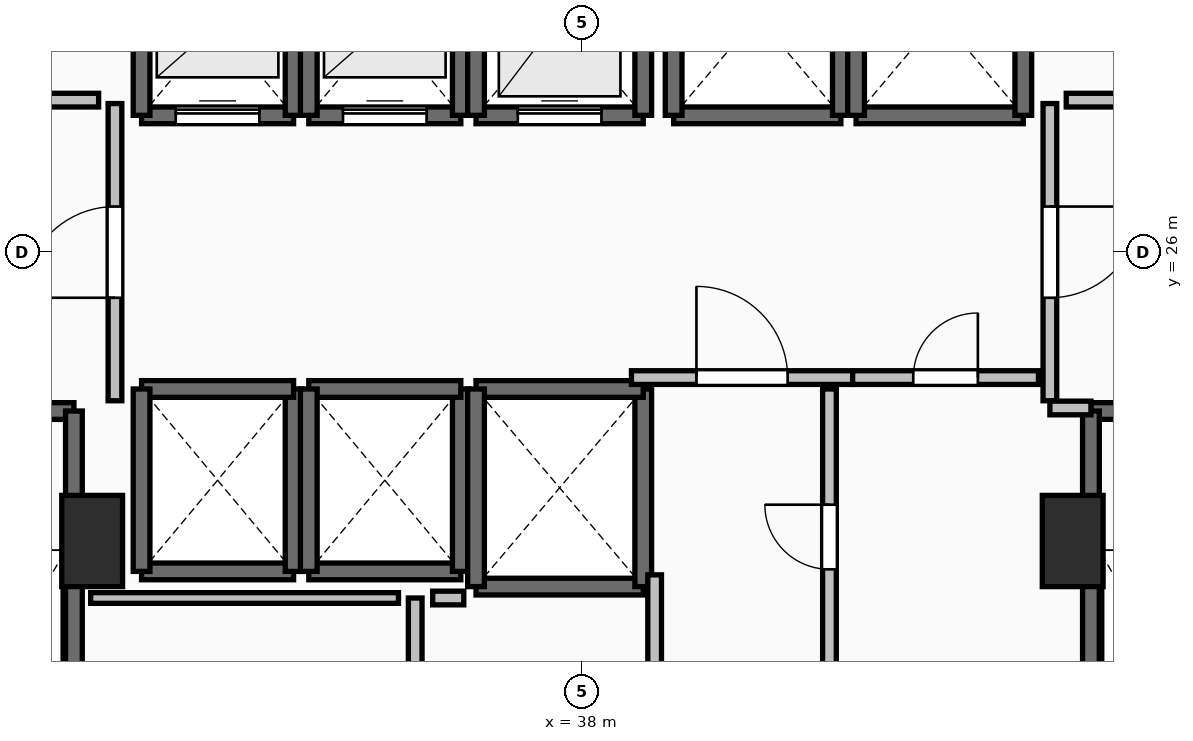
"""IFC4 building model, lengths in metres.
Left out: names, types, materials, properties, quantities, classifications, styles, units other than length and angle.
Written with IfcOpenShell. Run it as: python <this file> out.ifc"""

import sys

from ifc_helpers import new_model, si_unit, direction, frame, frame_2d, origin, origin_2d, place, context, subcontext, project, spatial, rectangle, extrude, element, fill, save


model = new_model("IFC4")
c1 = context("Model", 3, precision=1e-05, world=origin(), true_north=direction((0.0, 1.0)))
c2 = subcontext(c1, "Body", "Model", "MODEL_VIEW")
j1 = project(units=[si_unit("LENGTHUNIT", "METRE"), si_unit("PLANEANGLEUNIT", "RADIAN")], contexts=[c1])
p1 = place(None, origin())
s1 = spatial("IfcSite", under=j1, at=p1, CompositionType="ELEMENT")
p2 = place(p1, origin())
s2 = spatial("IfcBuilding", under=s1, at=p2, CompositionType="ELEMENT")
p3 = place(p2, frame((0.0, 0.0, 24.0)))
s3 = spatial("IfcBuildingStorey", under=s2, at=p3, CompositionType="ELEMENT", Elevation=24.0)
for number, where, z_axis, x_axis in (
    (1, (31.55, 22.2, 0.0), (0.0, 0.0, 1.0), (1.0, 0.0, 0.0)),
    (2, (44.45, 22.2, 0.0), (0.0, 0.0, 1.0), (1.0, 0.0, 0.0)),
):
    element("IfcColumn", number, at=place(p3, frame(where, z_axis=z_axis, x_axis=x_axis)), inside=s3, PredefinedType="PILASTER", context=c2, shape_type="SweptSolid", body=[
        extrude(rectangle(XDim=0.8, YDim=1.2, at=origin_2d()), origin(), (0.0, 0.0, 1.0), 3.5),
    ])
p4 = place(p3, frame((27.94, 23.91, 0.0), z_axis=(0.0, 0.0, 1.0), x_axis=(1.0, 0.0, 0.0)))
e3 = element("IfcWall", 3, at=p4, inside=s3, PredefinedType="SOLIDWALL", context=c2, shape_type="SweptSolid", body=[
    extrude(rectangle(XDim=3.37, YDim=0.22, at=frame_2d((1.685, 0.0))), origin(), (0.0, 0.0, 1.0), 3.24),
])
p5 = place(p4, frame((1.135, 0.0, 0.0)))
e4 = element("IfcOpeningElement", 4, at=p5, cuts=e3, PredefinedType="OPENING", context=c2, shape_type="SweptSolid", body=[
    extrude(rectangle(XDim=1.1, YDim=2.15, at=frame_2d((0.55, 1.075))), frame((0.0, 0.125, 0.0), z_axis=(0.0, -1.0, 0.0), x_axis=(1.0, 0.0, 0.0)), (0.0, 0.0, 1.0), 0.25),
])
p6 = place(p3, frame((31.31, 23.91, 0.0), z_axis=(0.0, 0.0, 1.0), x_axis=(0.0, -1.0, 0.0)))
e5 = element("IfcWall", 5, at=p6, inside=s3, PredefinedType="SOLIDWALL", context=c2, shape_type="SweptSolid", body=[
    extrude(rectangle(XDim=7.42, YDim=0.22, at=frame_2d((3.71, 0.0))), origin(), (0.0, 0.0, 1.0), 3.24),
])
p7 = place(p3, frame((44.69, 23.91, 0.0), z_axis=(0.0, 0.0, 1.0), x_axis=(1.0, 0.0, 0.0)))
e6 = element("IfcWall", 6, at=p7, inside=s3, PredefinedType="SOLIDWALL", context=c2, shape_type="SweptSolid", body=[
    extrude(rectangle(XDim=3.37, YDim=0.22, at=frame_2d((1.685, 0.0))), origin(), (0.0, 0.0, 1.0), 3.24),
])
p8 = place(p7, frame((1.135, 0.0, 0.0)))
e7 = element("IfcOpeningElement", 7, at=p8, cuts=e6, PredefinedType="OPENING", context=c2, shape_type="SweptSolid", body=[
    extrude(rectangle(XDim=1.1, YDim=2.15, at=frame_2d((0.55, 1.075))), frame((0.0, 0.125, 0.0), z_axis=(0.0, -1.0, 0.0), x_axis=(1.0, 0.0, 0.0)), (0.0, 0.0, 1.0), 0.25),
])
p9 = place(p3, frame((44.69, 16.49, 0.0), z_axis=(0.0, 0.0, 1.0), x_axis=(0.0, 1.0, 0.0)))
e8 = element("IfcWall", 8, at=p9, inside=s3, PredefinedType="SOLIDWALL", context=c2, shape_type="SweptSolid", body=[
    extrude(rectangle(XDim=7.42, YDim=0.22, at=frame_2d((3.71, 0.0))), origin(), (0.0, 0.0, 1.0), 3.24),
])
p10 = place(p3, frame((32.2, 27.8, 0.0), z_axis=(0.0, 0.0, 1.0), x_axis=(1.0, 0.0, 0.0)))
e9 = element("IfcWall", 9, at=p10, inside=s3, PredefinedType="SOLIDWALL", context=c2, shape_type="SweptSolid", body=[
    extrude(rectangle(XDim=2.0, YDim=0.22, at=frame_2d((1.0, 0.0))), origin(), (0.0, 0.0, 1.0), 3.24),
])
p11 = place(p10, frame((0.45, 0.0, 0.0)))
e10 = element("IfcOpeningElement", 10, at=p11, cuts=e9, PredefinedType="OPENING", context=c2, shape_type="SweptSolid", body=[
    extrude(rectangle(XDim=1.1, YDim=2.2, at=frame_2d((0.55, 1.1))), frame((0.0, 0.125, 0.0), z_axis=(0.0, -1.0, 0.0), x_axis=(1.0, 0.0, 0.0)), (0.0, 0.0, 1.0), 0.25),
])
for number, where, z_axis, x_axis in (
    (11, (34.2, 27.8, 0.0), (0.0, 0.0, 1.0), (0.0, 1.0, 0.0)),
    (12, (32.2, 30.2, 0.0), (0.0, 0.0, 1.0), (0.0, -1.0, 0.0)),
):
    element("IfcWall", number, at=place(p3, frame(where, z_axis=z_axis, x_axis=x_axis)), inside=s3, PredefinedType="SOLIDWALL", context=c2, shape_type="SweptSolid", body=[
        extrude(rectangle(XDim=2.4, YDim=0.22, at=frame_2d((1.2, 0.0))), origin(), (0.0, 0.0, 1.0), 3.24),
    ])
p12 = place(p3, frame((34.4, 27.8, 0.0), z_axis=(0.0, 0.0, 1.0), x_axis=(1.0, 0.0, 0.0)))
e13 = element("IfcWall", 13, at=p12, inside=s3, PredefinedType="SOLIDWALL", context=c2, shape_type="SweptSolid", body=[
    extrude(rectangle(XDim=2.0, YDim=0.22, at=frame_2d((1.0, 0.0))), origin(), (0.0, 0.0, 1.0), 3.24),
])
p13 = place(p12, frame((0.45, 0.0, 0.0)))
e14 = element("IfcOpeningElement", 14, at=p13, cuts=e13, PredefinedType="OPENING", context=c2, shape_type="SweptSolid", body=[
    extrude(rectangle(XDim=1.1, YDim=2.2, at=frame_2d((0.55, 1.1))), frame((0.0, 0.125, 0.0), z_axis=(0.0, -1.0, 0.0), x_axis=(1.0, 0.0, 0.0)), (0.0, 0.0, 1.0), 0.25),
])
for number, where, z_axis, x_axis in (
    (15, (36.4, 27.8, 0.0), (0.0, 0.0, 1.0), (0.0, 1.0, 0.0)),
    (16, (34.4, 30.2, 0.0), (0.0, 0.0, 1.0), (0.0, -1.0, 0.0)),
):
    element("IfcWall", number, at=place(p3, frame(where, z_axis=z_axis, x_axis=x_axis)), inside=s3, PredefinedType="SOLIDWALL", context=c2, shape_type="SweptSolid", body=[
        extrude(rectangle(XDim=2.4, YDim=0.22, at=frame_2d((1.2, 0.0))), origin(), (0.0, 0.0, 1.0), 3.24),
    ])
p14 = place(p3, frame((36.6, 27.8, 0.0), z_axis=(0.0, 0.0, 1.0), x_axis=(1.0, 0.0, 0.0)))
e17 = element("IfcWall", 17, at=p14, inside=s3, PredefinedType="SOLIDWALL", context=c2, shape_type="SweptSolid", body=[
    extrude(rectangle(XDim=2.2, YDim=0.22, at=frame_2d((1.1, 0.0))), origin(), (0.0, 0.0, 1.0), 3.24),
])
p15 = place(p14, frame((0.55, 0.0, 0.0)))
e18 = element("IfcOpeningElement", 18, at=p15, cuts=e17, PredefinedType="OPENING", context=c2, shape_type="SweptSolid", body=[
    extrude(rectangle(XDim=1.1, YDim=2.2, at=frame_2d((0.55, 1.1))), frame((0.0, 0.125, 0.0), z_axis=(0.0, -1.0, 0.0), x_axis=(1.0, 0.0, 0.0)), (0.0, 0.0, 1.0), 0.25),
])
for number, where, z_axis, x_axis in (
    (19, (38.8, 27.8, 0.0), (0.0, 0.0, 1.0), (0.0, 1.0, 0.0)),
    (20, (36.6, 30.4, 0.0), (0.0, 0.0, 1.0), (0.0, -1.0, 0.0)),
):
    element("IfcWall", number, at=place(p3, frame(where, z_axis=z_axis, x_axis=x_axis)), inside=s3, PredefinedType="SOLIDWALL", context=c2, shape_type="SweptSolid", body=[
        extrude(rectangle(XDim=2.6, YDim=0.22, at=frame_2d((1.3, 0.0))), origin(), (0.0, 0.0, 1.0), 3.24),
    ])
p16 = place(p3, frame((32.2, 21.8, 0.0), z_axis=(0.0, 0.0, 1.0), x_axis=(1.0, 0.0, 0.0)))
e21 = element("IfcWall", 21, at=p16, inside=s3, PredefinedType="SOLIDWALL", context=c2, shape_type="SweptSolid", body=[
    extrude(rectangle(XDim=2.0, YDim=0.22, at=frame_2d((1.0, 0.0))), origin(), (0.0, 0.0, 1.0), 3.24),
])
p17 = place(p3, frame((34.2, 21.8, 0.0), z_axis=(0.0, 0.0, 1.0), x_axis=(0.0, 1.0, 0.0)))
e22 = element("IfcWall", 22, at=p17, inside=s3, PredefinedType="SOLIDWALL", context=c2, shape_type="SweptSolid", body=[
    extrude(rectangle(XDim=2.4, YDim=0.22, at=frame_2d((1.2, 0.0))), origin(), (0.0, 0.0, 1.0), 3.24),
])
p18 = place(p3, frame((34.2, 24.2, 0.0), z_axis=(0.0, 0.0, 1.0), x_axis=(-1.0, 0.0, 0.0)))
e23 = element("IfcWall", 23, at=p18, inside=s3, PredefinedType="SOLIDWALL", context=c2, shape_type="SweptSolid", body=[
    extrude(rectangle(XDim=2.0, YDim=0.22, at=frame_2d((1.0, 0.0))), origin(), (0.0, 0.0, 1.0), 3.24),
])
p19 = place(p3, frame((32.2, 24.2, 0.0), z_axis=(0.0, 0.0, 1.0), x_axis=(0.0, -1.0, 0.0)))
e24 = element("IfcWall", 24, at=p19, inside=s3, PredefinedType="SOLIDWALL", context=c2, shape_type="SweptSolid", body=[
    extrude(rectangle(XDim=2.4, YDim=0.22, at=frame_2d((1.2, 0.0))), origin(), (0.0, 0.0, 1.0), 3.24),
])
p20 = place(p3, frame((34.4, 21.8, 0.0), z_axis=(0.0, 0.0, 1.0), x_axis=(1.0, 0.0, 0.0)))
e25 = element("IfcWall", 25, at=p20, inside=s3, PredefinedType="SOLIDWALL", context=c2, shape_type="SweptSolid", body=[
    extrude(rectangle(XDim=2.0, YDim=0.22, at=frame_2d((1.0, 0.0))), origin(), (0.0, 0.0, 1.0), 3.24),
])
p21 = place(p3, frame((36.4, 21.8, 0.0), z_axis=(0.0, 0.0, 1.0), x_axis=(0.0, 1.0, 0.0)))
e26 = element("IfcWall", 26, at=p21, inside=s3, PredefinedType="SOLIDWALL", context=c2, shape_type="SweptSolid", body=[
    extrude(rectangle(XDim=2.4, YDim=0.22, at=frame_2d((1.2, 0.0))), origin(), (0.0, 0.0, 1.0), 3.24),
])
p22 = place(p3, frame((36.4, 24.2, 0.0), z_axis=(0.0, 0.0, 1.0), x_axis=(-1.0, 0.0, 0.0)))
e27 = element("IfcWall", 27, at=p22, inside=s3, PredefinedType="SOLIDWALL", context=c2, shape_type="SweptSolid", body=[
    extrude(rectangle(XDim=2.0, YDim=0.22, at=frame_2d((1.0, 0.0))), origin(), (0.0, 0.0, 1.0), 3.24),
])
p23 = place(p3, frame((34.4, 24.2, 0.0), z_axis=(0.0, 0.0, 1.0), x_axis=(0.0, -1.0, 0.0)))
e28 = element("IfcWall", 28, at=p23, inside=s3, PredefinedType="SOLIDWALL", context=c2, shape_type="SweptSolid", body=[
    extrude(rectangle(XDim=2.4, YDim=0.22, at=frame_2d((1.2, 0.0))), origin(), (0.0, 0.0, 1.0), 3.24),
])
p24 = place(p3, frame((36.6, 21.6, 0.0), z_axis=(0.0, 0.0, 1.0), x_axis=(1.0, 0.0, 0.0)))
e29 = element("IfcWall", 29, at=p24, inside=s3, PredefinedType="SOLIDWALL", context=c2, shape_type="SweptSolid", body=[
    extrude(rectangle(XDim=2.2, YDim=0.22, at=frame_2d((1.1, 0.0))), origin(), (0.0, 0.0, 1.0), 3.24),
])
p25 = place(p3, frame((38.8, 21.6, 0.0), z_axis=(0.0, 0.0, 1.0), x_axis=(0.0, 1.0, 0.0)))
e30 = element("IfcWall", 30, at=p25, inside=s3, PredefinedType="SOLIDWALL", context=c2, shape_type="SweptSolid", body=[
    extrude(rectangle(XDim=2.6, YDim=0.22, at=frame_2d((1.3, 0.0))), origin(), (0.0, 0.0, 1.0), 3.24),
])
p26 = place(p3, frame((38.8, 24.2, 0.0), z_axis=(0.0, 0.0, 1.0), x_axis=(-1.0, 0.0, 0.0)))
e31 = element("IfcWall", 31, at=p26, inside=s3, PredefinedType="SOLIDWALL", context=c2, shape_type="SweptSolid", body=[
    extrude(rectangle(XDim=2.2, YDim=0.22, at=frame_2d((1.1, 0.0))), origin(), (0.0, 0.0, 1.0), 3.24),
])
p27 = place(p3, frame((36.6, 24.2, 0.0), z_axis=(0.0, 0.0, 1.0), x_axis=(0.0, -1.0, 0.0)))
e32 = element("IfcWall", 32, at=p27, inside=s3, PredefinedType="SOLIDWALL", context=c2, shape_type="SweptSolid", body=[
    extrude(rectangle(XDim=2.6, YDim=0.22, at=frame_2d((1.3, 0.0))), origin(), (0.0, 0.0, 1.0), 3.24),
])
p28 = place(p3, frame((39.2, 27.8, 0.0), z_axis=(0.0, 0.0, 1.0), x_axis=(1.0, 0.0, 0.0)))
e33 = element("IfcWall", 33, at=p28, inside=s3, PredefinedType="SOLIDWALL", context=c2, shape_type="SweptSolid", body=[
    extrude(rectangle(XDim=2.2, YDim=0.22, at=frame_2d((1.1, 0.0))), origin(), (0.0, 0.0, 1.0), 3.24),
])
for number, where, z_axis, x_axis in (
    (34, (41.4, 27.8, 0.0), (0.0, 0.0, 1.0), (0.0, 1.0, 0.0)),
    (35, (39.2, 30.4, 0.0), (0.0, 0.0, 1.0), (0.0, -1.0, 0.0)),
):
    element("IfcWall", number, at=place(p3, frame(where, z_axis=z_axis, x_axis=x_axis)), inside=s3, PredefinedType="SOLIDWALL", context=c2, shape_type="SweptSolid", body=[
        extrude(rectangle(XDim=2.6, YDim=0.22, at=frame_2d((1.3, 0.0))), origin(), (0.0, 0.0, 1.0), 3.24),
    ])
p29 = place(p3, frame((41.6, 27.8, 0.0), z_axis=(0.0, 0.0, 1.0), x_axis=(1.0, 0.0, 0.0)))
e36 = element("IfcWall", 36, at=p29, inside=s3, PredefinedType="SOLIDWALL", context=c2, shape_type="SweptSolid", body=[
    extrude(rectangle(XDim=2.2, YDim=0.22, at=frame_2d((1.1, 0.0))), origin(), (0.0, 0.0, 1.0), 3.24),
])
for number, where, z_axis, x_axis in (
    (37, (43.8, 27.8, 0.0), (0.0, 0.0, 1.0), (0.0, 1.0, 0.0)),
    (38, (41.6, 30.4, 0.0), (0.0, 0.0, 1.0), (0.0, -1.0, 0.0)),
):
    element("IfcWall", number, at=place(p3, frame(where, z_axis=z_axis, x_axis=x_axis)), inside=s3, PredefinedType="SOLIDWALL", context=c2, shape_type="SweptSolid", body=[
        extrude(rectangle(XDim=2.6, YDim=0.22, at=frame_2d((1.3, 0.0))), origin(), (0.0, 0.0, 1.0), 3.24),
    ])
p30 = place(p3, frame((31.85, 24.045, 0.0), z_axis=(0.0, 0.0, 1.0), x_axis=(0.0, 1.0, 0.0)))
e39 = element("IfcWall", 39, at=p30, inside=s3, PredefinedType="PARTITIONING", context=c2, shape_type="SweptSolid", body=[
    extrude(rectangle(XDim=3.91, YDim=0.18, at=frame_2d((1.955, 0.0))), origin(), (0.0, 0.0, 1.0), 3.24),
])
p31 = place(p30, frame((1.355, 0.0, 0.0)))
e40 = element("IfcOpeningElement", 40, at=p31, cuts=e39, PredefinedType="OPENING", context=c2, shape_type="SweptSolid", body=[
    extrude(rectangle(XDim=1.2, YDim=2.15, at=frame_2d((0.6, 1.075))), frame((0.0, 0.105, 0.0), z_axis=(0.0, -1.0, 0.0), x_axis=(1.0, 0.0, 0.0)), (0.0, 0.0, 1.0), 0.21),
])
p32 = place(p3, frame((44.15, 27.955, 0.0), z_axis=(0.0, 0.0, 1.0), x_axis=(0.0, -1.0, 0.0)))
e41 = element("IfcWall", 41, at=p32, inside=s3, PredefinedType="PARTITIONING", context=c2, shape_type="SweptSolid", body=[
    extrude(rectangle(XDim=3.91, YDim=0.18, at=frame_2d((1.955, 0.0))), origin(), (0.0, 0.0, 1.0), 3.24),
])
p33 = place(p32, frame((1.355, 0.0, 0.0)))
e42 = element("IfcOpeningElement", 42, at=p33, cuts=e41, PredefinedType="OPENING", context=c2, shape_type="SweptSolid", body=[
    extrude(rectangle(XDim=1.2, YDim=2.15, at=frame_2d((0.6, 1.075))), frame((0.0, 0.105, 0.0), z_axis=(0.0, -1.0, 0.0), x_axis=(1.0, 0.0, 0.0)), (0.0, 0.0, 1.0), 0.21),
])
p34 = place(p3, frame((44.15, 23.95, 0.0), z_axis=(0.0, 0.0, 1.0), x_axis=(1.0, 0.0, 0.0)))
e43 = element("IfcWall", 43, at=p34, inside=s3, PredefinedType="PARTITIONING", context=c2, shape_type="SweptSolid", body=[
    extrude(rectangle(XDim=0.54, YDim=0.18, at=frame_2d((0.27, 0.0))), origin(), (0.0, 0.0, 1.0), 3.24),
])
p35 = place(p3, frame((38.645, 24.35, 0.0), z_axis=(0.0, 0.0, 1.0), x_axis=(1.0, 0.0, 0.0)))
e44 = element("IfcWall", 44, at=p35, inside=s3, PredefinedType="PARTITIONING", context=c2, shape_type="SweptSolid", body=[
    extrude(rectangle(XDim=2.91, YDim=0.18, at=frame_2d((1.455, 0.0))), origin(), (0.0, 0.0, 1.0), 3.24),
])
p36 = place(p35, frame((0.855, 0.0, 0.0)))
e45 = element("IfcOpeningElement", 45, at=p36, cuts=e44, PredefinedType="OPENING", context=c2, shape_type="SweptSolid", body=[
    extrude(rectangle(XDim=1.2, YDim=2.15, at=frame_2d((0.6, 1.075))), frame((0.0, 0.105, 0.0), z_axis=(0.0, -1.0, 0.0), x_axis=(1.0, 0.0, 0.0)), (0.0, 0.0, 1.0), 0.21),
])
p37 = place(p3, frame((41.555, 24.35, 0.0), z_axis=(0.0, 0.0, 1.0), x_axis=(1.0, 0.0, 0.0)))
e46 = element("IfcWall", 46, at=p37, inside=s3, PredefinedType="PARTITIONING", context=c2, shape_type="SweptSolid", body=[
    extrude(rectangle(XDim=2.445, YDim=0.18, at=frame_2d((1.223, 0.0))), origin(), (0.0, 0.0, 1.0), 3.24),
])
p38 = place(p37, frame((0.798, 0.0, 0.0)))
e47 = element("IfcOpeningElement", 47, at=p38, cuts=e46, PredefinedType="OPENING", context=c2, shape_type="SweptSolid", body=[
    extrude(rectangle(XDim=0.85, YDim=2.1, at=frame_2d((0.425, 1.05))), frame((0.0, 0.105, 0.0), z_axis=(0.0, -1.0, 0.0), x_axis=(1.0, 0.0, 0.0)), (0.0, 0.0, 1.0), 0.21),
])
p39 = place(p3, frame((41.25, 20.305, 0.0), z_axis=(0.0, 0.0, 1.0), x_axis=(0.0, 1.0, 0.0)))
e48 = element("IfcWall", 48, at=p39, inside=s3, PredefinedType="PARTITIONING", context=c2, shape_type="SweptSolid", body=[
    extrude(rectangle(XDim=3.895, YDim=0.18, at=frame_2d((1.948, 0.0))), origin(), (0.0, 0.0, 1.0), 3.24),
])
p40 = place(p39, frame((1.522, 0.0, 0.0)))
e49 = element("IfcOpeningElement", 49, at=p40, cuts=e48, PredefinedType="OPENING", context=c2, shape_type="SweptSolid", body=[
    extrude(rectangle(XDim=0.85, YDim=2.1, at=frame_2d((0.425, 1.05))), frame((0.0, 0.105, 0.0), z_axis=(0.0, -1.0, 0.0), x_axis=(1.0, 0.0, 0.0)), (0.0, 0.0, 1.0), 0.21),
])
p41 = place(p3, frame((38.95, 21.755, 0.0), z_axis=(0.0, 0.0, 1.0), x_axis=(0.0, -1.0, 0.0)))
e50 = element("IfcWall", 50, at=p41, inside=s3, PredefinedType="PARTITIONING", context=c2, shape_type="SweptSolid", body=[
    extrude(rectangle(XDim=5.435, YDim=0.18, at=frame_2d((2.717, 0.0))), origin(), (0.0, 0.0, 1.0), 3.24),
])
p42 = place(p41, frame((2.018, 0.0, 0.0)))
e51 = element("IfcOpeningElement", 51, at=p42, cuts=e50, PredefinedType="OPENING", context=c2, shape_type="SweptSolid", body=[
    extrude(rectangle(XDim=1.4, YDim=2.2, at=frame_2d((0.7, 1.1))), frame((0.0, 0.105, 0.0), z_axis=(0.0, -1.0, 0.0), x_axis=(1.0, 0.0, 0.0)), (0.0, 0.0, 1.0), 0.21),
])
p43 = place(p3, frame((35.8, 16.32, 0.0), z_axis=(0.0, 0.0, 1.0), x_axis=(0.0, 1.0, 0.0)))
e52 = element("IfcWall", 52, at=p43, inside=s3, PredefinedType="PARTITIONING", context=c2, shape_type="SweptSolid", body=[
    extrude(rectangle(XDim=5.13, YDim=0.18, at=frame_2d((2.565, 0.0))), origin(), (0.0, 0.0, 1.0), 3.24),
])
for number, where, z_axis, x_axis in (
    (53, (31.635, 28.0, 0.0), (0.0, 0.0, 1.0), (-1.0, 0.0, 0.0)),
    (54, (45.28, 28.0, 0.0), (0.0, 0.0, 1.0), (-1.0, 0.0, 0.0)),
):
    element("IfcWall", number, at=place(p3, frame(where, z_axis=z_axis, x_axis=x_axis)), inside=s3, PredefinedType="PARTITIONING", context=c2, shape_type="SweptSolid", body=[
        extrude(rectangle(XDim=0.915, YDim=0.18, at=frame_2d((0.458, 0.0))), origin(), (0.0, 0.0, 1.0), 3.24),
    ])
p44 = place(p3, frame((35.58, 21.45, 0.0), z_axis=(0.0, 0.0, 1.0), x_axis=(-1.0, 0.0, 0.0)))
e55 = element("IfcWall", 55, at=p44, inside=s3, PredefinedType="PARTITIONING", context=c2, shape_type="SweptSolid", body=[
    extrude(rectangle(XDim=4.05, YDim=0.14, at=frame_2d((2.025, 0.0))), origin(), (0.0, 0.0, 1.0), 3.24),
])
p45 = place(p3, frame((36.439, 21.45, 0.0), z_axis=(0.0, 0.0, 1.0), x_axis=(-1.0, 0.0, 0.0)))
e56 = element("IfcWall", 56, at=p45, inside=s3, PredefinedType="PARTITIONING", context=c2, shape_type="SweptSolid", body=[
    extrude(rectangle(XDim=0.409, YDim=0.18, at=frame_2d((0.205, 0.0))), origin(), (0.0, 0.0, 1.0), 3.24),
])
p46 = place(p11, origin())
e57 = element("IfcDoor", 57, at=p46, inside=s3, OperationType="SLIDING_TO_LEFT", PredefinedType="DOOR", context=c2, shape_type="SweptSolid", body=[
    extrude(rectangle(XDim=1.1, YDim=2.2, at=frame_2d((0.55, 1.1))), frame((0.0, 0.025, 0.0), z_axis=(0.0, -1.0, 0.0), x_axis=(1.0, 0.0, 0.0)), (0.0, 0.0, 1.0), 0.05),
])
fill(e10, e57)
p47 = place(p13, origin())
e58 = element("IfcDoor", 58, at=p47, inside=s3, OperationType="SLIDING_TO_LEFT", PredefinedType="DOOR", context=c2, shape_type="SweptSolid", body=[
    extrude(rectangle(XDim=1.1, YDim=2.2, at=frame_2d((0.55, 1.1))), frame((0.0, 0.025, 0.0), z_axis=(0.0, -1.0, 0.0), x_axis=(1.0, 0.0, 0.0)), (0.0, 0.0, 1.0), 0.05),
])
fill(e14, e58)
p48 = place(p15, origin())
e59 = element("IfcDoor", 59, at=p48, inside=s3, OperationType="SLIDING_TO_LEFT", PredefinedType="DOOR", context=c2, shape_type="SweptSolid", body=[
    extrude(rectangle(XDim=1.1, YDim=2.2, at=frame_2d((0.55, 1.1))), frame((0.0, 0.025, 0.0), z_axis=(0.0, -1.0, 0.0), x_axis=(1.0, 0.0, 0.0)), (0.0, 0.0, 1.0), 0.05),
])
fill(e18, e59)
p49 = place(p31, origin())
e60 = element("IfcDoor", 60, at=p49, inside=s3, OperationType="SINGLE_SWING_LEFT", PredefinedType="DOOR", context=c2, shape_type="SweptSolid", body=[
    extrude(rectangle(XDim=1.2, YDim=2.15, at=frame_2d((0.6, 1.075))), frame((0.0, 0.025, 0.0), z_axis=(0.0, -1.0, 0.0), x_axis=(1.0, 0.0, 0.0)), (0.0, 0.0, 1.0), 0.05),
])
fill(e40, e60)
p50 = place(p33, origin())
e61 = element("IfcDoor", 61, at=p50, inside=s3, OperationType="SINGLE_SWING_LEFT", PredefinedType="DOOR", context=c2, shape_type="SweptSolid", body=[
    extrude(rectangle(XDim=1.2, YDim=2.15, at=frame_2d((0.6, 1.075))), frame((0.0, 0.025, 0.0), z_axis=(0.0, -1.0, 0.0), x_axis=(1.0, 0.0, 0.0)), (0.0, 0.0, 1.0), 0.05),
])
fill(e42, e61)
p51 = place(p36, origin())
e62 = element("IfcDoor", 62, at=p51, inside=s3, OperationType="SINGLE_SWING_LEFT", PredefinedType="DOOR", context=c2, shape_type="SweptSolid", body=[
    extrude(rectangle(XDim=1.2, YDim=2.15, at=frame_2d((0.6, 1.075))), frame((0.0, 0.025, 0.0), z_axis=(0.0, -1.0, 0.0), x_axis=(1.0, 0.0, 0.0)), (0.0, 0.0, 1.0), 0.05),
])
fill(e45, e62)
p52 = place(p38, origin())
e63 = element("IfcDoor", 63, at=p52, inside=s3, OperationType="SINGLE_SWING_RIGHT", PredefinedType="DOOR", context=c2, shape_type="SweptSolid", body=[
    extrude(rectangle(XDim=0.85, YDim=2.1, at=frame_2d((0.425, 1.05))), frame((0.0, 0.025, 0.0), z_axis=(0.0, -1.0, 0.0), x_axis=(1.0, 0.0, 0.0)), (0.0, 0.0, 1.0), 0.05),
])
fill(e47, e63)
p53 = place(p40, origin())
e64 = element("IfcDoor", 64, at=p53, inside=s3, OperationType="SINGLE_SWING_RIGHT", PredefinedType="DOOR", context=c2, shape_type="SweptSolid", body=[
    extrude(rectangle(XDim=0.85, YDim=2.1, at=frame_2d((0.425, 1.05))), frame((0.0, 0.025, 0.0), z_axis=(0.0, -1.0, 0.0), x_axis=(1.0, 0.0, 0.0)), (0.0, 0.0, 1.0), 0.05),
])
fill(e49, e64)
save(model, sys.argv[1])
